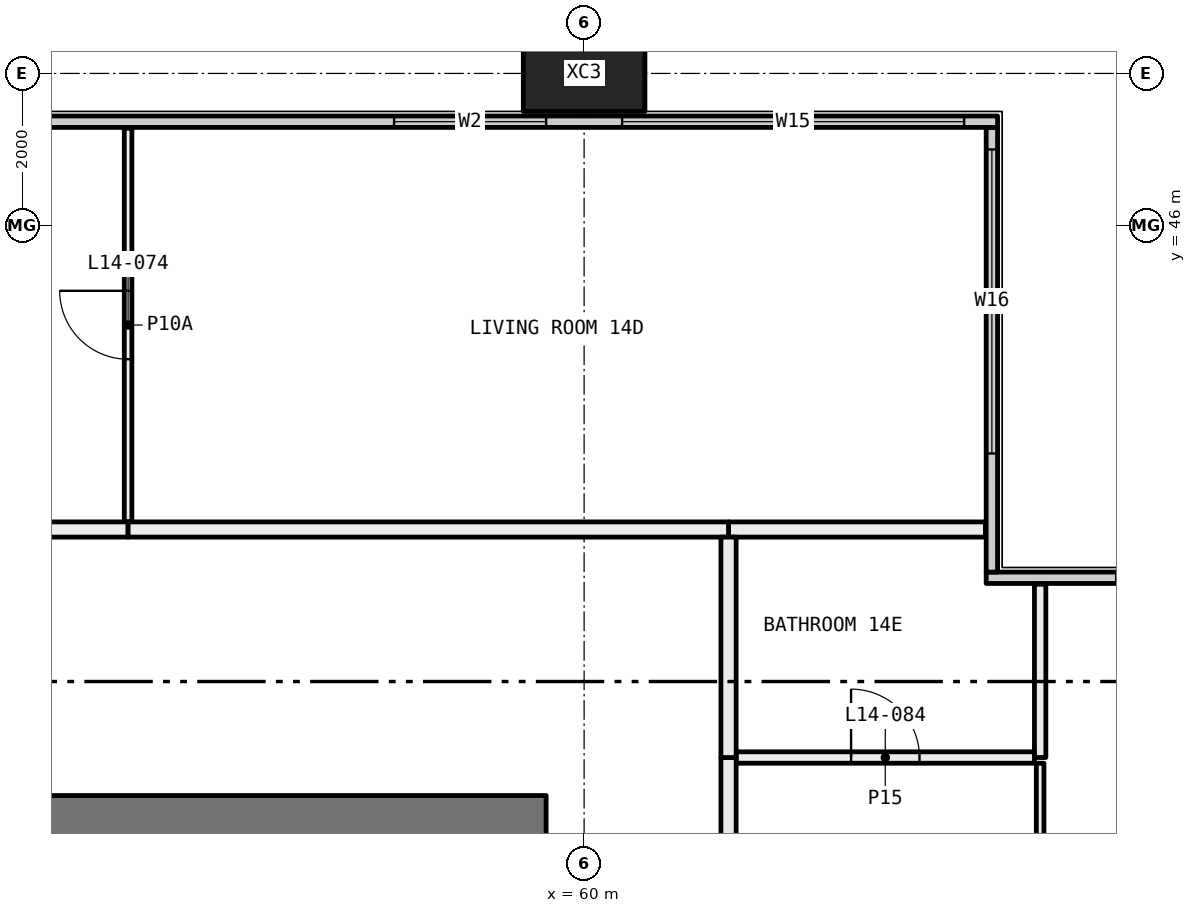
"""IFC4 building model, lengths in metres.
Left out: names, types, materials, properties, quantities, classifications, styles, units other than length and angle.
Written with IfcOpenShell. Run it as: python <this file> out.ifc"""

import sys

from ifc_helpers import new_model, si_unit, direction, frame, frame_2d, origin, origin_2d, place, context, subcontext, project, spatial, rectangle, hollow_rectangle, extrude, element, fill, save


model = new_model("IFC4")
c1 = context("Model", 3, precision=1e-05, world=origin(), true_north=direction((0.0, 1.0)))
c2 = subcontext(c1, "Body", "Model", "MODEL_VIEW")
j1 = project(units=[si_unit("LENGTHUNIT", "METRE"), si_unit("PLANEANGLEUNIT", "RADIAN")], contexts=[c1])
p1 = place(None, origin())
s1 = spatial("IfcSite", under=j1, at=p1, CompositionType="ELEMENT")
p2 = place(p1, origin())
s2 = spatial("IfcBuilding", under=s1, at=p2, CompositionType="ELEMENT")
p3 = place(p2, frame((0.0, 0.0, 61.05)))
s3 = spatial("IfcBuildingStorey", under=s2, at=p3, CompositionType="ELEMENT", Elevation=61.05)
p4 = place(p3, frame((60.0, 48.0, -0.4), z_axis=(0.0, 0.0, 1.0), x_axis=(1.0, 0.0, 0.0)))
e1 = element("IfcColumn", 1, at=p4, inside=s3, PredefinedType="COLUMN", context=c2, shape_type="SweptSolid", body=[
    extrude(hollow_rectangle(XDim=1.6, YDim=1.0, WallThickness=0.065, at=origin_2d()), origin(), (0.0, 0.0, 1.0), 3.45),
])
p5 = place(p3, frame((65.29, 41.365, 0.0), z_axis=(0.0, 0.0, 1.0), x_axis=(1.0, 0.0, 0.0)))
e2 = element("IfcWall", 2, at=p5, inside=s3, PredefinedType="ELEMENTEDWALL", context=c2, shape_type="SweptSolid", body=[
    extrude(rectangle(XDim=6.15, YDim=0.15, at=frame_2d((3.075, 0.0))), origin(), (0.0, 0.0, 1.0), 3.05),
])
p6 = place(p5, frame((1.71, 0.0, 0.45)))
e3 = element("IfcOpeningElement", 3, at=p6, cuts=e2, PredefinedType="OPENING", context=c2, shape_type="SweptSolid", body=[
    extrude(rectangle(XDim=4.0, YDim=2.55, at=frame_2d((2.0, 1.275))), frame((0.0, 0.085, 0.0), z_axis=(0.0, -1.0, 0.0), x_axis=(1.0, 0.0, 0.0)), (0.0, 0.0, 1.0), 0.17),
])
p7 = place(p3, frame((65.365, 41.44, 0.0), z_axis=(0.0, 0.0, 1.0), x_axis=(0.0, 1.0, 0.0)))
e4 = element("IfcWall", 4, at=p7, inside=s3, PredefinedType="ELEMENTEDWALL", context=c2, shape_type="SweptSolid", body=[
    extrude(rectangle(XDim=5.85, YDim=0.15, at=frame_2d((2.925, 0.0))), origin(), (0.0, 0.0, 1.0), 3.05),
])
p8 = place(p7, frame((1.56, 0.0, 0.45)))
e5 = element("IfcOpeningElement", 5, at=p8, cuts=e4, PredefinedType="OPENING", context=c2, shape_type="SweptSolid", body=[
    extrude(rectangle(XDim=4.0, YDim=2.55, at=frame_2d((2.0, 1.275))), frame((0.0, 0.085, 0.0), z_axis=(0.0, -1.0, 0.0), x_axis=(1.0, 0.0, 0.0)), (0.0, 0.0, 1.0), 0.17),
])
p9 = place(p3, frame((6.56, 47.365, 0.0), z_axis=(0.0, 0.0, 1.0), x_axis=(1.0, 0.0, 0.0)))
e6 = element("IfcWall", 6, at=p9, inside=s3, PredefinedType="ELEMENTEDWALL", context=c2, shape_type="SweptSolid", body=[
    extrude(rectangle(XDim=58.88, YDim=0.15, at=frame_2d((29.44, 0.0))), origin(), (0.0, 0.0, 1.0), 3.05),
])
p10 = place(p9, frame((0.44, 0.0, 0.45)))
e7 = element("IfcOpeningElement", 7, at=p10, cuts=e6, PredefinedType="OPENING", context=c2, shape_type="SweptSolid", body=[
    extrude(rectangle(XDim=4.5, YDim=2.55, at=frame_2d((2.25, 1.275))), frame((0.0, 0.085, 0.0), z_axis=(0.0, -1.0, 0.0), x_axis=(1.0, 0.0, 0.0)), (0.0, 0.0, 1.0), 0.17),
])
p11 = place(p9, frame((5.94, 0.0, 0.45)))
e8 = element("IfcOpeningElement", 8, at=p11, cuts=e6, PredefinedType="OPENING", context=c2, shape_type="SweptSolid", body=[
    extrude(rectangle(XDim=3.0, YDim=2.55, at=frame_2d((1.5, 1.275))), frame((0.0, 0.085, 0.0), z_axis=(0.0, -1.0, 0.0), x_axis=(1.0, 0.0, 0.0)), (0.0, 0.0, 1.0), 0.17),
])
p12 = place(p9, frame((13.94, 0.0, 0.45)))
e9 = element("IfcOpeningElement", 9, at=p12, cuts=e6, PredefinedType="OPENING", context=c2, shape_type="SweptSolid", body=[
    extrude(rectangle(XDim=3.0, YDim=2.55, at=frame_2d((1.5, 1.275))), frame((0.0, 0.085, 0.0), z_axis=(0.0, -1.0, 0.0), x_axis=(1.0, 0.0, 0.0)), (0.0, 0.0, 1.0), 0.17),
])
p13 = place(p9, frame((17.94, 0.0, 0.45)))
e10 = element("IfcOpeningElement", 10, at=p13, cuts=e6, PredefinedType="OPENING", context=c2, shape_type="SweptSolid", body=[
    extrude(rectangle(XDim=3.0, YDim=2.55, at=frame_2d((1.5, 1.275))), frame((0.0, 0.085, 0.0), z_axis=(0.0, -1.0, 0.0), x_axis=(1.0, 0.0, 0.0)), (0.0, 0.0, 1.0), 0.17),
])
p14 = place(p9, frame((26.94, 0.0, 0.45)))
e11 = element("IfcOpeningElement", 11, at=p14, cuts=e6, PredefinedType="OPENING", context=c2, shape_type="SweptSolid", body=[
    extrude(rectangle(XDim=2.0, YDim=2.55, at=frame_2d((1.0, 1.275))), frame((0.0, 0.085, 0.0), z_axis=(0.0, -1.0, 0.0), x_axis=(1.0, 0.0, 0.0)), (0.0, 0.0, 1.0), 0.17),
])
p15 = place(p9, frame((29.94, 0.0, 0.45)))
e12 = element("IfcOpeningElement", 12, at=p15, cuts=e6, PredefinedType="OPENING", context=c2, shape_type="SweptSolid", body=[
    extrude(rectangle(XDim=3.0, YDim=2.55, at=frame_2d((1.5, 1.275))), frame((0.0, 0.085, 0.0), z_axis=(0.0, -1.0, 0.0), x_axis=(1.0, 0.0, 0.0)), (0.0, 0.0, 1.0), 0.17),
])
p16 = place(p9, frame((37.94, 0.0, 0.45)))
e13 = element("IfcOpeningElement", 13, at=p16, cuts=e6, PredefinedType="OPENING", context=c2, shape_type="SweptSolid", body=[
    extrude(rectangle(XDim=3.0, YDim=2.55, at=frame_2d((1.5, 1.275))), frame((0.0, 0.085, 0.0), z_axis=(0.0, -1.0, 0.0), x_axis=(1.0, 0.0, 0.0)), (0.0, 0.0, 1.0), 0.17),
])
p17 = place(p9, frame((41.94, 0.0, 0.45)))
e14 = element("IfcOpeningElement", 14, at=p17, cuts=e6, PredefinedType="OPENING", context=c2, shape_type="SweptSolid", body=[
    extrude(rectangle(XDim=3.0, YDim=2.55, at=frame_2d((1.5, 1.275))), frame((0.0, 0.085, 0.0), z_axis=(0.0, -1.0, 0.0), x_axis=(1.0, 0.0, 0.0)), (0.0, 0.0, 1.0), 0.17),
])
p18 = place(p9, frame((50.94, 0.0, 0.45)))
e15 = element("IfcOpeningElement", 15, at=p18, cuts=e6, PredefinedType="OPENING", context=c2, shape_type="SweptSolid", body=[
    extrude(rectangle(XDim=2.0, YDim=2.55, at=frame_2d((1.0, 1.275))), frame((0.0, 0.085, 0.0), z_axis=(0.0, -1.0, 0.0), x_axis=(1.0, 0.0, 0.0)), (0.0, 0.0, 1.0), 0.17),
])
p19 = place(p9, frame((53.94, 0.0, 0.45)))
e16 = element("IfcOpeningElement", 16, at=p19, cuts=e6, PredefinedType="OPENING", context=c2, shape_type="SweptSolid", body=[
    extrude(rectangle(XDim=4.5, YDim=2.55, at=frame_2d((2.25, 1.275))), frame((0.0, 0.085, 0.0), z_axis=(0.0, -1.0, 0.0), x_axis=(1.0, 0.0, 0.0)), (0.0, 0.0, 1.0), 0.17),
])
p20 = place(p3, frame((54.0, 42.1, 0.0), z_axis=(0.0, 0.0, 1.0), x_axis=(0.0, 1.0, 0.0)))
e17 = element("IfcWall", 17, at=p20, inside=s3, PredefinedType="PARTITIONING", context=c2, shape_type="SweptSolid", body=[
    extrude(rectangle(XDim=5.18, YDim=0.1, at=frame_2d((2.59, 0.0))), origin(), (0.0, 0.0, 1.0), 3.05),
])
p21 = place(p20, frame((2.14, 0.0, 0.0)))
e18 = element("IfcOpeningElement", 18, at=p21, cuts=e17, PredefinedType="OPENING", context=c2, shape_type="SweptSolid", body=[
    extrude(rectangle(XDim=0.9, YDim=2.1, at=frame_2d((0.45, 1.05))), frame((0.0, 0.06, 0.0), z_axis=(0.0, -1.0, 0.0), x_axis=(1.0, 0.0, 0.0)), (0.0, 0.0, 1.0), 0.12),
])
p22 = place(p3, frame((48.0, 42.0, 0.0), z_axis=(0.0, 0.0, 1.0), x_axis=(1.0, 0.0, 0.0)))
e19 = element("IfcWall", 19, at=p22, inside=s3, PredefinedType="PARTITIONING", context=c2, shape_type="SweptSolid", body=[
    extrude(rectangle(XDim=6.0, YDim=0.2, at=frame_2d((3.0, 0.0))), origin(), (0.0, 0.0, 1.0), 3.05),
])
p23 = place(p3, frame((61.9, 42.0, 0.0), z_axis=(0.0, 0.0, 1.0), x_axis=(1.0, 0.0, 0.0)))
e20 = element("IfcWall", 20, at=p23, inside=s3, PredefinedType="PARTITIONING", context=c2, shape_type="SweptSolid", body=[
    extrude(rectangle(XDim=3.38, YDim=0.2, at=frame_2d((1.69, 0.0))), origin(), (0.0, 0.0, 1.0), 3.05),
])
p24 = place(p3, frame((54.0, 42.0, 0.0), z_axis=(0.0, 0.0, 1.0), x_axis=(1.0, 0.0, 0.0)))
e21 = element("IfcWall", 21, at=p24, inside=s3, PredefinedType="PARTITIONING", context=c2, shape_type="SweptSolid", body=[
    extrude(rectangle(XDim=7.9, YDim=0.2, at=frame_2d((3.95, 0.0))), origin(), (0.0, 0.0, 1.0), 3.05),
])
p25 = place(p3, frame((66.0, 38.925, 0.0), z_axis=(0.0, 0.0, 1.0), x_axis=(0.0, -1.0, 0.0)))
e22 = element("IfcWall", 22, at=p25, inside=s3, PredefinedType="PARTITIONING", context=c2, shape_type="SweptSolid", body=[
    extrude(rectangle(XDim=3.025, YDim=0.1, at=frame_2d((1.513, 0.0))), origin(), (0.0, 0.0, 1.0), 2.45),
])
p26 = place(p3, frame((66.0, 41.28, 0.0), z_axis=(0.0, 0.0, 1.0), x_axis=(0.0, -1.0, 0.0)))
e23 = element("IfcWall", 23, at=p26, inside=s3, PredefinedType="PARTITIONING", context=c2, shape_type="SweptSolid", body=[
    extrude(rectangle(XDim=2.28, YDim=0.15, at=frame_2d((1.14, 0.0))), origin(), (0.0, 0.0, 1.0), 3.05),
])
p27 = place(p3, frame((65.925, 39.0, 0.0), z_axis=(0.0, 0.0, 1.0), x_axis=(-1.0, 0.0, 0.0)))
e24 = element("IfcWall", 24, at=p27, inside=s3, PredefinedType="PARTITIONING", context=c2, shape_type="SweptSolid", body=[
    extrude(rectangle(XDim=3.925, YDim=0.15, at=frame_2d((1.962, 0.0))), origin(), (0.0, 0.0, 1.0), 3.05),
])
p28 = place(p27, frame((1.512, 0.0, 0.0)))
e25 = element("IfcOpeningElement", 25, at=p28, cuts=e24, PredefinedType="OPENING", context=c2, shape_type="SweptSolid", body=[
    extrude(rectangle(XDim=0.9, YDim=2.1, at=frame_2d((0.45, 1.05))), frame((0.0, 0.085, 0.0), z_axis=(0.0, -1.0, 0.0), x_axis=(1.0, 0.0, 0.0)), (0.0, 0.0, 1.0), 0.17),
])
p29 = place(p3, frame((61.9, 39.0, 0.0), z_axis=(0.0, 0.0, 1.0), x_axis=(0.0, -1.0, 0.0)))
e26 = element("IfcWall", 26, at=p29, inside=s3, PredefinedType="PARTITIONING", context=c2, shape_type="SweptSolid", body=[
    extrude(rectangle(XDim=3.1, YDim=0.2, at=frame_2d((1.55, 0.0))), origin(), (0.0, 0.0, 1.0), 2.45),
])
p30 = place(p3, frame((61.9, 41.9, 0.0), z_axis=(0.0, 0.0, 1.0), x_axis=(0.0, -1.0, 0.0)))
e27 = element("IfcWall", 27, at=p30, inside=s3, PredefinedType="PARTITIONING", context=c2, shape_type="SweptSolid", body=[
    extrude(rectangle(XDim=2.9, YDim=0.2, at=frame_2d((1.45, 0.0))), origin(), (0.0, 0.0, 1.0), 3.05),
])
p31 = place(p3, frame((59.5, 38.1, 0.0), z_axis=(0.0, 0.0, 1.0), x_axis=(-1.0, 0.0, 0.0)))
e28 = element("IfcWall", 28, at=p31, inside=s3, PredefinedType="SHEAR", context=c2, shape_type="SweptSolid", body=[
    extrude(rectangle(XDim=11.0, YDim=0.8, at=frame_2d((5.5, 0.0))), origin(), (0.0, 0.0, 1.0), 3.05),
])
p32 = place(p31, frame((8.4, 0.0, 0.0)))
e29 = element("IfcOpeningElement", 29, at=p32, cuts=e28, PredefinedType="OPENING", context=c2, shape_type="SweptSolid", body=[
    extrude(rectangle(XDim=1.6, YDim=2.1, at=frame_2d((0.8, 1.05))), frame((0.0, 0.41, 0.0), z_axis=(0.0, -1.0, 0.0), x_axis=(1.0, 0.0, 0.0)), (0.0, 0.0, 1.0), 0.82),
])
p33 = place(p8, origin())
e30 = element("IfcWindow", 30, at=p33, inside=s3, PartitioningType="SINGLE_PANEL", PredefinedType="WINDOW", context=c2, shape_type="SweptSolid", body=[
    extrude(rectangle(XDim=4.0, YDim=2.55, at=frame_2d((2.0, 1.275))), frame((0.0, 0.03, 0.0), z_axis=(0.0, -1.0, 0.0), x_axis=(1.0, 0.0, 0.0)), (0.0, 0.0, 1.0), 0.06),
])
fill(e5, e30)
p34 = place(p18, origin())
e31 = element("IfcWindow", 31, at=p34, inside=s3, PartitioningType="SINGLE_PANEL", PredefinedType="WINDOW", context=c2, shape_type="SweptSolid", body=[
    extrude(rectangle(XDim=2.0, YDim=2.55, at=frame_2d((1.0, 1.275))), frame((0.0, 0.03, 0.0), z_axis=(0.0, -1.0, 0.0), x_axis=(1.0, 0.0, 0.0)), (0.0, 0.0, 1.0), 0.06),
])
fill(e15, e31)
p35 = place(p19, origin())
e32 = element("IfcWindow", 32, at=p35, inside=s3, PartitioningType="SINGLE_PANEL", PredefinedType="WINDOW", context=c2, shape_type="SweptSolid", body=[
    extrude(rectangle(XDim=4.5, YDim=2.55, at=frame_2d((2.25, 1.275))), frame((0.0, 0.03, 0.0), z_axis=(0.0, -1.0, 0.0), x_axis=(1.0, 0.0, 0.0)), (0.0, 0.0, 1.0), 0.06),
])
fill(e16, e32)
p36 = place(p21, origin())
e33 = element("IfcDoor", 33, at=p36, inside=s3, OperationType="SINGLE_SWING_LEFT", PredefinedType="DOOR", context=c2, shape_type="SweptSolid", body=[
    extrude(rectangle(XDim=0.9, YDim=2.1, at=frame_2d((0.45, 1.05))), frame((0.0, 0.025, 0.0), z_axis=(0.0, -1.0, 0.0), x_axis=(1.0, 0.0, 0.0)), (0.0, 0.0, 1.0), 0.05),
])
fill(e18, e33)
p37 = place(p28, frame((0.9, 0.0, 0.0), x_axis=(-1.0, 0.0, 0.0)))
e34 = element("IfcDoor", 34, at=p37, inside=s3, OperationType="SINGLE_SWING_RIGHT", PredefinedType="DOOR", context=c2, shape_type="SweptSolid", body=[
    extrude(rectangle(XDim=0.9, YDim=2.1, at=frame_2d((0.45, 1.05))), frame((0.0, 0.025, 0.0), z_axis=(0.0, -1.0, 0.0), x_axis=(1.0, 0.0, 0.0)), (0.0, 0.0, 1.0), 0.05),
])
fill(e25, e34)
save(model, sys.argv[1])
